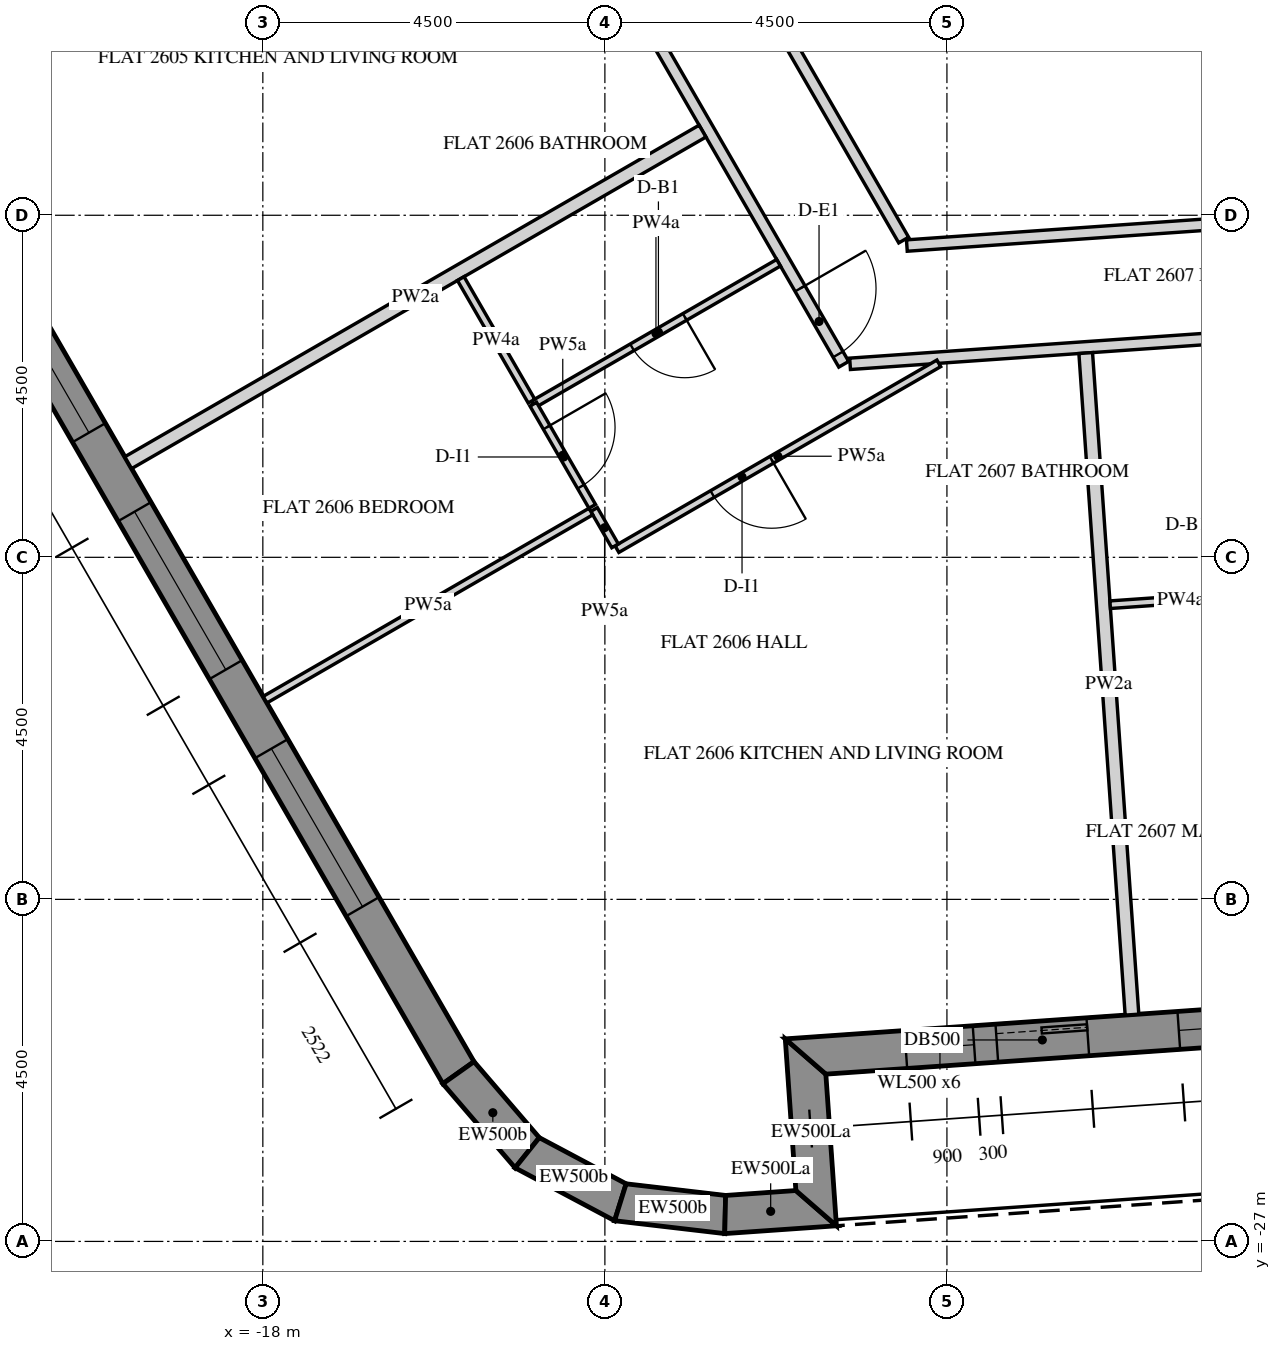
"""IFC4 building model, lengths in metres.
Left out: names, types, materials, properties, quantities, classifications, styles, units other than length and angle.
Written with IfcOpenShell. Run it as: python <this file> out.ifc"""

import sys

from ifc_helpers import new_model, si_unit, direction, frame, frame_2d, origin, place, context, subcontext, project, spatial, polyline, rectangle, outline, extrude, element, fill, save


model = new_model("IFC4")
c1 = context("Model", 3, precision=1e-05, world=origin(), true_north=direction((0.0, 1.0)))
c2 = subcontext(c1, "Body", "Model", "MODEL_VIEW")
j1 = project(units=[si_unit("LENGTHUNIT", "METRE"), si_unit("PLANEANGLEUNIT", "RADIAN")], contexts=[c1])
p1 = place(None, origin())
s1 = spatial("IfcSite", under=j1, at=p1, CompositionType="ELEMENT")
p2 = place(p1, origin())
s2 = spatial("IfcBuilding", under=s1, at=p2, CompositionType="ELEMENT")
p3 = place(p2, frame((0.0, 0.0, 334.2)))
s3 = spatial("IfcBuildingStorey", under=s2, at=p3, CompositionType="ELEMENT", Elevation=334.2)
p4 = place(p3, frame((-28.149, -2.745, -0.15), z_axis=(0.0, 0.0, 1.0), x_axis=(0.500003737743, -0.866023245787, 0.0)))
e1 = element("IfcWall", 1, at=p4, inside=s3, PredefinedType="SOLIDWALL", context=c2, shape_type="SweptSolid", body=[
    extrude(outline(polyline([(-0.021, -0.25), (25.468, -0.25), (25.421, 0.25), (0.021, 0.25), (-0.021, -0.25)])), origin(), (0.0, 0.0, 1.0), 3.75),
])
p5 = place(p4, frame((2.522, 0.0, 0.75)))
e2 = element("IfcOpeningElement", 2, at=p5, cuts=e1, PredefinedType="OPENING", context=c2, shape_type="SweptSolid", body=[
    extrude(rectangle(XDim=2.4, YDim=2.7, at=frame_2d((1.2, 1.35))), frame((0.0, 0.26, 0.0), z_axis=(0.0, -1.0, 0.0), x_axis=(1.0, 0.0, 0.0)), (0.0, 0.0, 1.0), 0.52),
])
p6 = place(p4, frame((6.122, 0.0, 0.75)))
e3 = element("IfcOpeningElement", 3, at=p6, cuts=e1, PredefinedType="OPENING", context=c2, shape_type="SweptSolid", body=[
    extrude(rectangle(XDim=2.4, YDim=2.7, at=frame_2d((1.2, 1.35))), frame((0.0, 0.26, 0.0), z_axis=(0.0, -1.0, 0.0), x_axis=(1.0, 0.0, 0.0)), (0.0, 0.0, 1.0), 0.52),
])
p7 = place(p4, frame((9.722, 0.0, 0.75)))
e4 = element("IfcOpeningElement", 4, at=p7, cuts=e1, PredefinedType="OPENING", context=c2, shape_type="SweptSolid", body=[
    extrude(rectangle(XDim=2.4, YDim=2.7, at=frame_2d((1.2, 1.35))), frame((0.0, 0.26, 0.0), z_axis=(0.0, -1.0, 0.0), x_axis=(1.0, 0.0, 0.0)), (0.0, 0.0, 1.0), 0.52),
])
p8 = place(p4, frame((13.323, 0.0, 0.75)))
e5 = element("IfcOpeningElement", 5, at=p8, cuts=e1, PredefinedType="OPENING", context=c2, shape_type="SweptSolid", body=[
    extrude(rectangle(XDim=2.4, YDim=2.7, at=frame_2d((1.2, 1.35))), frame((0.0, 0.26, 0.0), z_axis=(0.0, -1.0, 0.0), x_axis=(1.0, 0.0, 0.0)), (0.0, 0.0, 1.0), 0.52),
])
p9 = place(p4, frame((16.922, 0.0, 0.75)))
e6 = element("IfcOpeningElement", 6, at=p9, cuts=e1, PredefinedType="OPENING", context=c2, shape_type="SweptSolid", body=[
    extrude(rectangle(XDim=2.4, YDim=2.7, at=frame_2d((1.2, 1.35))), frame((0.0, 0.26, 0.0), z_axis=(0.0, -1.0, 0.0), x_axis=(1.0, 0.0, 0.0)), (0.0, 0.0, 1.0), 0.52),
])
p10 = place(p4, frame((20.522, 0.0, 0.75)))
e7 = element("IfcOpeningElement", 7, at=p10, cuts=e1, PredefinedType="OPENING", context=c2, shape_type="SweptSolid", body=[
    extrude(rectangle(XDim=2.4, YDim=2.7, at=frame_2d((1.2, 1.35))), frame((0.0, 0.26, 0.0), z_axis=(0.0, -1.0, 0.0), x_axis=(1.0, 0.0, 0.0)), (0.0, 0.0, 1.0), 0.52),
])
p11 = place(p3, frame((-15.427, -24.78, -0.15), z_axis=(0.0, 0.0, 1.0), x_axis=(0.651616566281, -0.758548515619, 0.0)))
e8 = element("IfcWall", 8, at=p11, inside=s3, PredefinedType="SOLIDWALL", context=c2, shape_type="SweptSolid", body=[
    extrude(outline(polyline([(-0.023, -0.25), (1.435, -0.25), (1.341, 0.25), (0.023, 0.25), (-0.023, -0.25)])), origin(), (0.0, 0.0, 1.0), 3.75),
])
p12 = place(p3, frame((-14.522, -25.833, -0.15), z_axis=(0.0, 0.0, 1.0), x_axis=(0.882926676147, -0.469510899286, 0.0)))
e9 = element("IfcWall", 9, at=p12, inside=s3, PredefinedType="SOLIDWALL", context=c2, shape_type="SweptSolid", body=[
    extrude(outline(polyline([(-0.047, -0.25), (1.436, -0.25), (1.341, 0.25), (0.047, 0.25), (-0.047, -0.25)])), origin(), (0.0, 0.0, 1.0), 3.75),
])
p13 = place(p3, frame((-13.296, -26.485, -0.15), z_axis=(0.0, 0.0, 1.0), x_axis=(0.993239161627, -0.116086036245, 0.0)))
e10 = element("IfcWall", 10, at=p13, inside=s3, PredefinedType="SOLIDWALL", context=c2, shape_type="SweptSolid", body=[
    extrude(outline(polyline([(-0.047, -0.25), (1.411, -0.25), (1.365, 0.25), (0.047, 0.25), (-0.047, -0.25)])), origin(), (0.0, 0.0, 1.0), 3.75),
])
p14 = place(p3, frame((-11.917, -26.646, -0.15), z_axis=(0.0, 0.0, 1.0), x_axis=(0.997562933087, 0.069772448216, 0.0)))
e11 = element("IfcWall", 11, at=p14, inside=s3, PredefinedType="SOLIDWALL", context=c2, shape_type="SweptSolid", body=[
    extrude(outline(polyline([(-0.023, -0.25), (1.45, -0.25), (0.95, 0.25), (0.023, 0.25), (-0.023, -0.25)])), origin(), (0.0, 0.0, 1.0), 3.75),
])
p15 = place(p3, frame((-10.72, -26.562, -0.15), z_axis=(0.0, 0.0, 1.0), x_axis=(-0.069824268692, 0.99755930726, 0.0)))
e12 = element("IfcWall", 12, at=p15, inside=s3, PredefinedType="SOLIDWALL", context=c2, shape_type="SweptSolid", body=[
    extrude(outline(polyline([(-0.25, -0.25), (1.75, -0.25), (2.25, 0.25), (0.25, 0.25), (-0.25, -0.25)])), origin(), (0.0, 0.0, 1.0), 3.75),
])
p16 = place(p3, frame((-10.86, -24.567, -0.15), z_axis=(0.0, 0.0, 1.0), x_axis=(0.997564329317, 0.06975248292, 0.0)))
e13 = element("IfcWall", 13, at=p16, inside=s3, PredefinedType="SOLIDWALL", context=c2, shape_type="SweptSolid", body=[
    extrude(outline(polyline([(0.25, -0.25), (22.795, -0.25), (23.295, 0.25), (-0.25, 0.25), (0.25, -0.25)])), origin(), (0.0, 0.0, 1.0), 3.75),
])
p17 = place(p16, frame((1.323, 0.0, 1.05)))
e14 = element("IfcOpeningElement", 14, at=p17, cuts=e13, PredefinedType="OPENING", context=c2, shape_type="SweptSolid", body=[
    extrude(rectangle(XDim=0.9, YDim=1.5, at=frame_2d((0.45, 0.75))), frame((0.0, 0.26, 0.0), z_axis=(0.0, -1.0, 0.0), x_axis=(1.0, 0.0, 0.0)), (0.0, 0.0, 1.0), 0.52),
])
p18 = place(p16, frame((2.522, 0.0, 0.15)))
e15 = element("IfcOpeningElement", 15, at=p18, cuts=e13, PredefinedType="OPENING", context=c2, shape_type="SweptSolid", body=[
    extrude(rectangle(XDim=1.2, YDim=2.4, at=frame_2d((0.6, 1.2))), frame((0.0, 0.26, 0.0), z_axis=(0.0, -1.0, 0.0), x_axis=(1.0, 0.0, 0.0)), (0.0, 0.0, 1.0), 0.52),
])
p19 = place(p16, frame((4.922, 0.0, 1.05)))
e16 = element("IfcOpeningElement", 16, at=p19, cuts=e13, PredefinedType="OPENING", context=c2, shape_type="SweptSolid", body=[
    extrude(rectangle(XDim=0.9, YDim=1.5, at=frame_2d((0.45, 0.75))), frame((0.0, 0.26, 0.0), z_axis=(0.0, -1.0, 0.0), x_axis=(1.0, 0.0, 0.0)), (0.0, 0.0, 1.0), 0.52),
])
p20 = place(p16, frame((6.122, 0.0, 0.15)))
e17 = element("IfcOpeningElement", 17, at=p20, cuts=e13, PredefinedType="OPENING", context=c2, shape_type="SweptSolid", body=[
    extrude(rectangle(XDim=1.2, YDim=2.4, at=frame_2d((0.6, 1.2))), frame((0.0, 0.26, 0.0), z_axis=(0.0, -1.0, 0.0), x_axis=(1.0, 0.0, 0.0)), (0.0, 0.0, 1.0), 0.52),
])
p21 = place(p16, frame((8.522, 0.0, 1.05)))
e18 = element("IfcOpeningElement", 18, at=p21, cuts=e13, PredefinedType="OPENING", context=c2, shape_type="SweptSolid", body=[
    extrude(rectangle(XDim=0.9, YDim=1.5, at=frame_2d((0.45, 0.75))), frame((0.0, 0.26, 0.0), z_axis=(0.0, -1.0, 0.0), x_axis=(1.0, 0.0, 0.0)), (0.0, 0.0, 1.0), 0.52),
])
p22 = place(p16, frame((9.722, 0.0, 0.15)))
e19 = element("IfcOpeningElement", 19, at=p22, cuts=e13, PredefinedType="OPENING", context=c2, shape_type="SweptSolid", body=[
    extrude(rectangle(XDim=1.2, YDim=2.4, at=frame_2d((0.6, 1.2))), frame((0.0, 0.26, 0.0), z_axis=(0.0, -1.0, 0.0), x_axis=(1.0, 0.0, 0.0)), (0.0, 0.0, 1.0), 0.52),
])
p23 = place(p16, frame((12.122, 0.0, 1.05)))
e20 = element("IfcOpeningElement", 20, at=p23, cuts=e13, PredefinedType="OPENING", context=c2, shape_type="SweptSolid", body=[
    extrude(rectangle(XDim=0.9, YDim=1.5, at=frame_2d((0.45, 0.75))), frame((0.0, 0.26, 0.0), z_axis=(0.0, -1.0, 0.0), x_axis=(1.0, 0.0, 0.0)), (0.0, 0.0, 1.0), 0.52),
])
p24 = place(p16, frame((13.323, 0.0, 0.15)))
e21 = element("IfcOpeningElement", 21, at=p24, cuts=e13, PredefinedType="OPENING", context=c2, shape_type="SweptSolid", body=[
    extrude(rectangle(XDim=1.2, YDim=2.4, at=frame_2d((0.6, 1.2))), frame((0.0, 0.26, 0.0), z_axis=(0.0, -1.0, 0.0), x_axis=(1.0, 0.0, 0.0)), (0.0, 0.0, 1.0), 0.52),
])
p25 = place(p16, frame((15.722, 0.0, 1.05)))
e22 = element("IfcOpeningElement", 22, at=p25, cuts=e13, PredefinedType="OPENING", context=c2, shape_type="SweptSolid", body=[
    extrude(rectangle(XDim=0.9, YDim=1.5, at=frame_2d((0.45, 0.75))), frame((0.0, 0.26, 0.0), z_axis=(0.0, -1.0, 0.0), x_axis=(1.0, 0.0, 0.0)), (0.0, 0.0, 1.0), 0.52),
])
p26 = place(p16, frame((16.922, 0.0, 0.15)))
e23 = element("IfcOpeningElement", 23, at=p26, cuts=e13, PredefinedType="OPENING", context=c2, shape_type="SweptSolid", body=[
    extrude(rectangle(XDim=1.2, YDim=2.4, at=frame_2d((0.6, 1.2))), frame((0.0, 0.26, 0.0), z_axis=(0.0, -1.0, 0.0), x_axis=(1.0, 0.0, 0.0)), (0.0, 0.0, 1.0), 0.52),
])
p27 = place(p16, frame((19.323, 0.0, 1.05)))
e24 = element("IfcOpeningElement", 24, at=p27, cuts=e13, PredefinedType="OPENING", context=c2, shape_type="SweptSolid", body=[
    extrude(rectangle(XDim=0.9, YDim=1.5, at=frame_2d((0.45, 0.75))), frame((0.0, 0.26, 0.0), z_axis=(0.0, -1.0, 0.0), x_axis=(1.0, 0.0, 0.0)), (0.0, 0.0, 1.0), 0.52),
])
p28 = place(p16, frame((20.522, 0.0, 0.15)))
e25 = element("IfcOpeningElement", 25, at=p28, cuts=e13, PredefinedType="OPENING", context=c2, shape_type="SweptSolid", body=[
    extrude(rectangle(XDim=1.2, YDim=2.4, at=frame_2d((0.6, 1.2))), frame((0.0, 0.26, 0.0), z_axis=(0.0, -1.0, 0.0), x_axis=(1.0, 0.0, 0.0)), (0.0, 0.0, 1.0), 0.52),
])
p29 = place(p3, frame((-17.696, -2.749, 0.0), z_axis=(0.0, 0.0, 1.0), x_axis=(0.499997948852, -0.866026588012, 0.0)))
e26 = element("IfcWall", 26, at=p29, inside=s3, PredefinedType="PARTITIONING", context=c2, shape_type="SweptSolid", body=[
    extrude(rectangle(XDim=14.677, YDim=0.15, at=frame_2d((7.339, 0.0))), origin(), (0.0, 0.0, 1.0), 2.838),
])
p30 = place(p29, frame((0.4, 0.0, 0.0)))
e27 = element("IfcOpeningElement", 27, at=p30, cuts=e26, PredefinedType="OPENING", context=c2, shape_type="SweptSolid", body=[
    extrude(rectangle(XDim=1.0, YDim=2.1, at=frame_2d((0.5, 1.05))), frame((0.0, 0.085, 0.0), z_axis=(0.0, -1.0, 0.0), x_axis=(1.0, 0.0, 0.0)), (0.0, 0.0, 1.0), 0.17),
])
p31 = place(p29, frame((13.527, 0.0, 0.0)))
e28 = element("IfcOpeningElement", 28, at=p31, cuts=e26, PredefinedType="OPENING", context=c2, shape_type="SweptSolid", body=[
    extrude(rectangle(XDim=1.0, YDim=2.1, at=frame_2d((0.5, 1.05))), frame((0.0, 0.085, 0.0), z_axis=(0.0, -1.0, 0.0), x_axis=(1.0, 0.0, 0.0)), (0.0, 0.0, 1.0), 0.17),
])
p32 = place(p3, frame((-10.274, -15.454, 0.0), z_axis=(0.0, 0.0, 1.0), x_axis=(0.997563645223, 0.069762265797, 0.0)))
e29 = element("IfcWall", 29, at=p32, inside=s3, PredefinedType="PARTITIONING", context=c2, shape_type="SweptSolid", body=[
    extrude(rectangle(XDim=16.606, YDim=0.15, at=frame_2d((8.303, 0.0))), origin(), (0.0, 0.0, 1.0), 2.838),
])
p33 = place(p32, frame((6.103, 0.0, 0.0)))
e30 = element("IfcOpeningElement", 30, at=p33, cuts=e29, PredefinedType="OPENING", context=c2, shape_type="SweptSolid", body=[
    extrude(rectangle(XDim=1.0, YDim=2.1, at=frame_2d((0.5, 1.05))), frame((0.0, 0.085, 0.0), z_axis=(0.0, -1.0, 0.0), x_axis=(1.0, 0.0, 0.0)), (0.0, 0.0, 1.0), 0.17),
])
p34 = place(p3, frame((6.717, -12.762, 0.0), z_axis=(0.0, 0.0, 1.0), x_axis=(-0.99756375843, -0.069760646978, 0.0)))
e31 = element("IfcWall", 31, at=p34, inside=s3, PredefinedType="PARTITIONING", context=c2, shape_type="SweptSolid", body=[
    extrude(rectangle(XDim=16.284, YDim=0.15, at=frame_2d((8.142, 0.0))), origin(), (0.0, 0.0, 1.0), 2.838),
])
p35 = place(p34, frame((7.692, 0.0, 0.0)))
e32 = element("IfcOpeningElement", 32, at=p35, cuts=e31, PredefinedType="OPENING", context=c2, shape_type="SweptSolid", body=[
    extrude(rectangle(XDim=0.9, YDim=2.1, at=frame_2d((0.45, 1.05))), frame((0.0, 0.085, 0.0), z_axis=(0.0, -1.0, 0.0), x_axis=(1.0, 0.0, 0.0)), (0.0, 0.0, 1.0), 0.17),
])
p36 = place(p3, frame((-9.569, -13.826, 0.0), z_axis=(0.0, 0.0, 1.0), x_axis=(-0.500017101833, 0.866015529811, 0.0)))
e33 = element("IfcWall", 33, at=p36, inside=s3, PredefinedType="PARTITIONING", context=c2, shape_type="SweptSolid", body=[
    extrude(rectangle(XDim=6.168, YDim=0.15, at=frame_2d((3.084, 0.0))), origin(), (0.0, 0.0, 1.0), 2.838),
])
p37 = place(p3, frame((-19.771, -16.755, 0.0), z_axis=(0.0, 0.0, 1.0), x_axis=(0.866025292695, 0.500000192413, 0.0)))
e34 = element("IfcWall", 34, at=p37, inside=s3, PredefinedType="PARTITIONING", context=c2, shape_type="SweptSolid", body=[
    extrude(rectangle(XDim=8.725, YDim=0.18, at=frame_2d((4.363, 0.0))), origin(), (0.0, 0.0, 1.0), 2.838),
])
p38 = place(p3, frame((-9.107, -15.448, 0.0), z_axis=(0.0, 0.0, 1.0), x_axis=(-0.866025094983, -0.500000534859, 0.0)))
e35 = element("IfcWall", 35, at=p38, inside=s3, PredefinedType="PARTITIONING", context=c2, shape_type="SweptSolid", body=[
    extrude(rectangle(XDim=4.889, YDim=0.1, at=frame_2d((2.445, 0.0))), origin(), (0.0, 0.0, 1.0), 2.838),
])
p39 = place(p38, frame((2.539, 0.0, 0.0)))
e36 = element("IfcOpeningElement", 36, at=p39, cuts=e35, PredefinedType="OPENING", context=c2, shape_type="SweptSolid", body=[
    extrude(rectangle(XDim=0.9, YDim=2.1, at=frame_2d((0.45, 1.05))), frame((0.0, 0.06, 0.0), z_axis=(0.0, -1.0, 0.0), x_axis=(1.0, 0.0, 0.0)), (0.0, 0.0, 1.0), 0.12),
])
p40 = place(p3, frame((-13.366, -17.849, 0.0), z_axis=(0.0, 0.0, 1.0), x_axis=(-0.499850094852, 0.866111934265, 0.0)))
e37 = element("IfcWall", 37, at=p40, inside=s3, PredefinedType="PARTITIONING", context=c2, shape_type="SweptSolid", body=[
    extrude(rectangle(XDim=0.552, YDim=0.1, at=frame_2d((0.276, 0.0))), origin(), (0.0, 0.0, 1.0), 2.838),
])
p41 = place(p3, frame((-13.684, -17.398, 0.0), z_axis=(0.0, 0.0, 1.0), x_axis=(-0.866040211805, -0.499974350878, 0.0)))
e38 = element("IfcWall", 38, at=p41, inside=s3, PredefinedType="PARTITIONING", context=c2, shape_type="SweptSolid", body=[
    extrude(rectangle(XDim=4.95, YDim=0.1, at=frame_2d((2.475, 0.0))), origin(), (0.0, 0.0, 1.0), 2.838),
])
p42 = place(p3, frame((-6.565, -24.017, 0.0), z_axis=(0.0, 0.0, 1.0), x_axis=(-0.06975756604, 0.997563973878, 0.0)))
e39 = element("IfcWall", 39, at=p42, inside=s3, PredefinedType="PARTITIONING", context=c2, shape_type="SweptSolid", body=[
    extrude(rectangle(XDim=8.725, YDim=0.18, at=frame_2d((4.363, 0.0))), origin(), (0.0, 0.0, 1.0), 2.838),
])
p43 = place(p3, frame((-11.215, -14.125, 0.0), z_axis=(0.0, 0.0, 1.0), x_axis=(-0.866028424924, -0.499994767197, 0.0)))
e40 = element("IfcWall", 40, at=p43, inside=s3, PredefinedType="PARTITIONING", context=c2, shape_type="SweptSolid", body=[
    extrude(rectangle(XDim=3.725, YDim=0.1, at=frame_2d((1.863, 0.0))), origin(), (0.0, 0.0, 1.0), 2.838),
])
p44 = place(p43, frame((1.425, 0.0, 0.0)))
e41 = element("IfcOpeningElement", 41, at=p44, cuts=e40, PredefinedType="OPENING", context=c2, shape_type="SweptSolid", body=[
    extrude(rectangle(XDim=0.8, YDim=2.1, at=frame_2d((0.4, 1.05))), frame((0.0, 0.06, 0.0), z_axis=(0.0, -1.0, 0.0), x_axis=(1.0, 0.0, 0.0)), (0.0, 0.0, 1.0), 0.12),
])
p45 = place(p3, frame((-14.442, -15.986, 0.0), z_axis=(0.0, 0.0, 1.0), x_axis=(0.50008102322, -0.865978619952, 0.0)))
e42 = element("IfcWall", 42, at=p45, inside=s3, PredefinedType="PARTITIONING", context=c2, shape_type="SweptSolid", body=[
    extrude(rectangle(XDim=1.552, YDim=0.1, at=frame_2d((0.776, 0.0))), origin(), (0.0, 0.0, 1.0), 2.838),
])
p46 = place(p45, frame((0.352, 0.0, 0.0)))
e43 = element("IfcOpeningElement", 43, at=p46, cuts=e42, PredefinedType="OPENING", context=c2, shape_type="SweptSolid", body=[
    extrude(rectangle(XDim=0.9, YDim=2.1, at=frame_2d((0.45, 1.05))), frame((0.0, 0.06, 0.0), z_axis=(0.0, -1.0, 0.0), x_axis=(1.0, 0.0, 0.0)), (0.0, 0.0, 1.0), 0.12),
])
p47 = place(p3, frame((-15.396, -14.333, 0.0), z_axis=(0.0, 0.0, 1.0), x_axis=(0.500115926523, -0.865958463229, 0.0)))
e44 = element("IfcWall", 44, at=p47, inside=s3, PredefinedType="PARTITIONING", context=c2, shape_type="SweptSolid", body=[
    extrude(rectangle(XDim=1.862, YDim=0.1, at=frame_2d((0.931, 0.0))), origin(), (0.0, 0.0, 1.0), 2.838),
])
p48 = place(p3, frame((-6.852, -18.623, 0.0), z_axis=(0.0, 0.0, 1.0), x_axis=(0.997564079323, 0.069756058123, 0.0)))
e45 = element("IfcWall", 45, at=p48, inside=s3, PredefinedType="PARTITIONING", context=c2, shape_type="SweptSolid", body=[
    extrude(rectangle(XDim=1.862, YDim=0.1, at=frame_2d((0.931, 0.0))), origin(), (0.0, 0.0, 1.0), 2.838),
])
p49 = place(p8, frame((0.0, 0.18, 0.0)))
e46 = element("IfcWindow", 46, at=p49, inside=s3, PartitioningType="DOUBLE_PANEL_VERTICAL", PredefinedType="WINDOW", context=c2, shape_type="SweptSolid", body=[
    extrude(rectangle(XDim=2.4, YDim=2.7, at=frame_2d((1.2, 1.35))), frame((0.0, 0.03, 0.0), z_axis=(0.0, -1.0, 0.0), x_axis=(1.0, 0.0, 0.0)), (0.0, 0.0, 1.0), 0.06),
])
fill(e5, e46)
p50 = place(p9, frame((0.0, 0.18, 0.0)))
e47 = element("IfcWindow", 47, at=p50, inside=s3, PartitioningType="DOUBLE_PANEL_VERTICAL", PredefinedType="WINDOW", context=c2, shape_type="SweptSolid", body=[
    extrude(rectangle(XDim=2.4, YDim=2.7, at=frame_2d((1.2, 1.35))), frame((0.0, 0.03, 0.0), z_axis=(0.0, -1.0, 0.0), x_axis=(1.0, 0.0, 0.0)), (0.0, 0.0, 1.0), 0.06),
])
fill(e6, e47)
p51 = place(p10, frame((0.0, 0.18, 0.0)))
e48 = element("IfcWindow", 48, at=p51, inside=s3, PartitioningType="DOUBLE_PANEL_VERTICAL", PredefinedType="WINDOW", context=c2, shape_type="SweptSolid", body=[
    extrude(rectangle(XDim=2.4, YDim=2.7, at=frame_2d((1.2, 1.35))), frame((0.0, 0.03, 0.0), z_axis=(0.0, -1.0, 0.0), x_axis=(1.0, 0.0, 0.0)), (0.0, 0.0, 1.0), 0.06),
])
fill(e7, e48)
p52 = place(p17, frame((0.0, 0.18, 0.0)))
e49 = element("IfcWindow", 49, at=p52, inside=s3, PartitioningType="SINGLE_PANEL", PredefinedType="WINDOW", context=c2, shape_type="SweptSolid", body=[
    extrude(rectangle(XDim=0.9, YDim=1.5, at=frame_2d((0.45, 0.75))), frame((0.0, 0.03, 0.0), z_axis=(0.0, -1.0, 0.0), x_axis=(1.0, 0.0, 0.0)), (0.0, 0.0, 1.0), 0.06),
])
fill(e14, e49)
p53 = place(p18, frame((0.0, 0.175, 0.0)))
e50 = element("IfcDoor", 50, at=p53, inside=s3, OperationType="SLIDING_TO_LEFT", PredefinedType="DOOR", context=c2, shape_type="SweptSolid", body=[
    extrude(rectangle(XDim=1.2, YDim=2.4, at=frame_2d((0.6, 1.2))), frame((0.0, 0.025, 0.0), z_axis=(0.0, -1.0, 0.0), x_axis=(1.0, 0.0, 0.0)), (0.0, 0.0, 1.0), 0.05),
])
fill(e15, e50)
p54 = place(p19, frame((0.0, 0.18, 0.0)))
e51 = element("IfcWindow", 51, at=p54, inside=s3, PartitioningType="SINGLE_PANEL", PredefinedType="WINDOW", context=c2, shape_type="SweptSolid", body=[
    extrude(rectangle(XDim=0.9, YDim=1.5, at=frame_2d((0.45, 0.75))), frame((0.0, 0.03, 0.0), z_axis=(0.0, -1.0, 0.0), x_axis=(1.0, 0.0, 0.0)), (0.0, 0.0, 1.0), 0.06),
])
fill(e16, e51)
p55 = place(p31, origin())
e52 = element("IfcDoor", 52, at=p55, inside=s3, OperationType="SINGLE_SWING_LEFT", PredefinedType="DOOR", context=c2, shape_type="SweptSolid", body=[
    extrude(rectangle(XDim=1.0, YDim=2.1, at=frame_2d((0.5, 1.05))), frame((0.0, 0.025, 0.0), z_axis=(0.0, -1.0, 0.0), x_axis=(1.0, 0.0, 0.0)), (0.0, 0.0, 1.0), 0.05),
])
fill(e28, e52)
p56 = place(p44, origin())
e53 = element("IfcDoor", 53, at=p56, inside=s3, OperationType="SINGLE_SWING_RIGHT", PredefinedType="DOOR", context=c2, shape_type="SweptSolid", body=[
    extrude(rectangle(XDim=0.8, YDim=2.1, at=frame_2d((0.4, 1.05))), frame((0.0, 0.025, 0.0), z_axis=(0.0, -1.0, 0.0), x_axis=(1.0, 0.0, 0.0)), (0.0, 0.0, 1.0), 0.05),
])
fill(e41, e53)
p57 = place(p39, origin())
e54 = element("IfcDoor", 54, at=p57, inside=s3, OperationType="SINGLE_SWING_LEFT", PredefinedType="DOOR", context=c2, shape_type="SweptSolid", body=[
    extrude(rectangle(XDim=0.9, YDim=2.1, at=frame_2d((0.45, 1.05))), frame((0.0, 0.025, 0.0), z_axis=(0.0, -1.0, 0.0), x_axis=(1.0, 0.0, 0.0)), (0.0, 0.0, 1.0), 0.05),
])
fill(e36, e54)
p58 = place(p46, origin())
e55 = element("IfcDoor", 55, at=p58, inside=s3, OperationType="SINGLE_SWING_LEFT", PredefinedType="DOOR", context=c2, shape_type="SweptSolid", body=[
    extrude(rectangle(XDim=0.9, YDim=2.1, at=frame_2d((0.45, 1.05))), frame((0.0, 0.025, 0.0), z_axis=(0.0, -1.0, 0.0), x_axis=(1.0, 0.0, 0.0)), (0.0, 0.0, 1.0), 0.05),
])
fill(e43, e55)
save(model, sys.argv[1])
